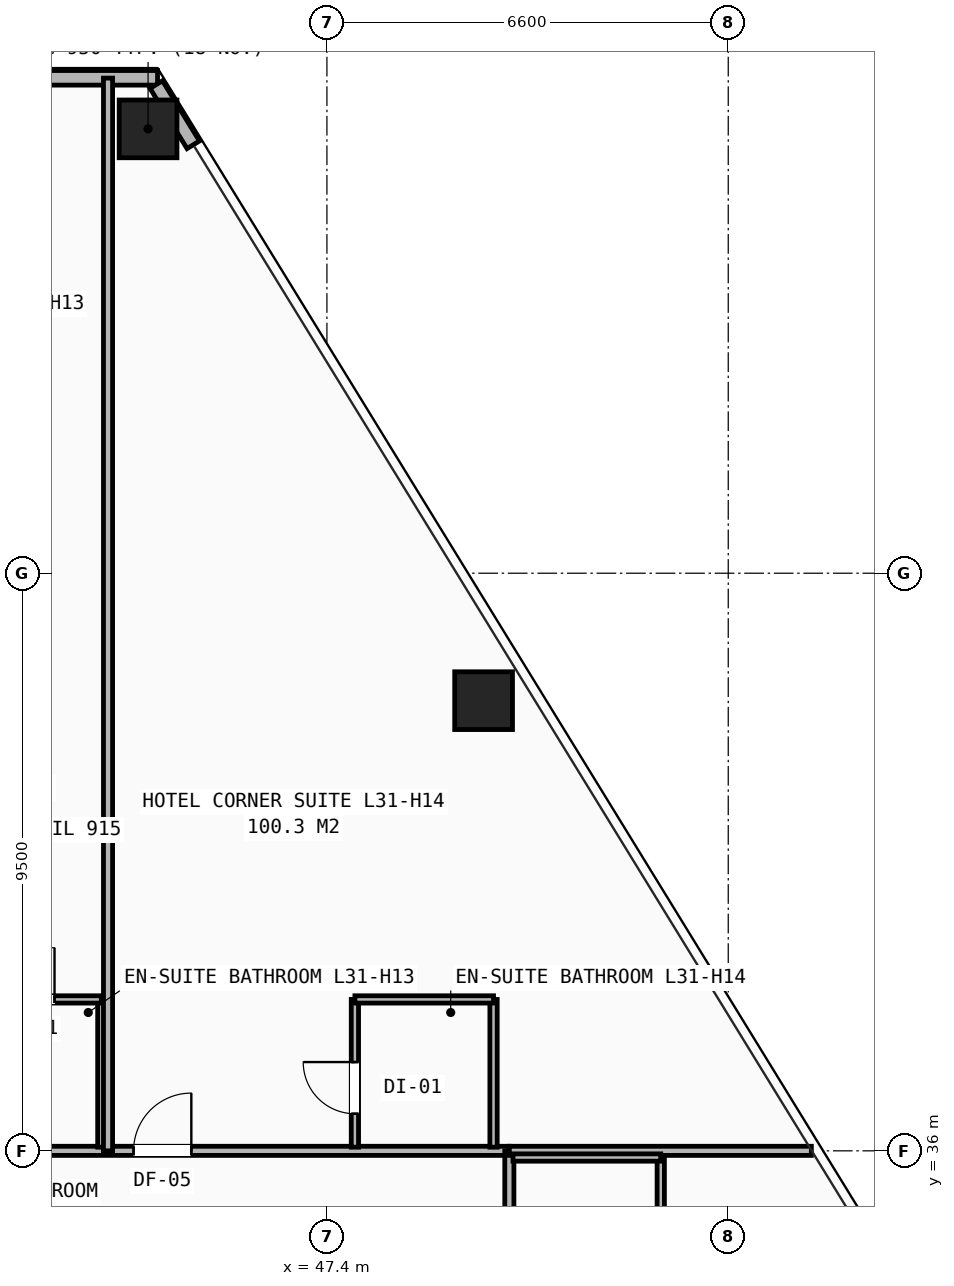
"""IFC4 building model, lengths in metres.
Left out: names, types, materials, properties, quantities, classifications, styles, units other than length and angle.
Written with IfcOpenShell. Run it as: python <this file> out.ifc"""

import sys

from ifc_helpers import new_model, si_unit, direction, frame, frame_2d, origin, origin_2d, place, context, subcontext, project, spatial, rectangle, hollow_rectangle, extrude, element, fill, save


model = new_model("IFC4")
c1 = context("Model", 3, precision=1e-05, world=origin(), true_north=direction((0.0, 1.0)))
c2 = subcontext(c1, "Body", "Model", "MODEL_VIEW")
j1 = project(units=[si_unit("LENGTHUNIT", "METRE"), si_unit("PLANEANGLEUNIT", "RADIAN")], contexts=[c1])
p1 = place(None, origin())
s1 = spatial("IfcSite", under=j1, at=p1, CompositionType="ELEMENT")
p2 = place(p1, origin())
s2 = spatial("IfcBuilding", under=s1, at=p2, CompositionType="ELEMENT")
p3 = place(p2, frame((0.0, 0.0, 108.6)))
s3 = spatial("IfcBuildingStorey", under=s2, at=p3, CompositionType="ELEMENT", Elevation=108.6)
for number, where, z_axis, x_axis in (
    (1, (44.458, 52.808, 0.0), (0.0, 0.0, 1.0), (1.0, 0.0, 0.0)),
    (2, (49.977, 43.404, 0.0), (0.0, 0.0, 1.0), (1.0, 0.0, 0.0)),
):
    element("IfcColumn", number, at=place(p3, frame(where, z_axis=z_axis, x_axis=x_axis)), inside=s3, PredefinedType="COLUMN", context=c2, shape_type="SweptSolid", body=[
        extrude(hollow_rectangle(XDim=0.95, YDim=0.95, WallThickness=0.065, at=origin_2d()), origin(), (0.0, 0.0, 1.0), 3.2),
    ])
p4 = place(p3, frame((35.386, 53.648, 0.0), z_axis=(0.0, 0.0, 1.0), x_axis=(1.0, 0.0, 0.0)))
e3 = element("IfcWall", 3, at=p4, inside=s3, PredefinedType="SHEAR", context=c2, shape_type="SweptSolid", body=[
    extrude(rectangle(XDim=9.229, YDim=0.24, at=frame_2d((4.614, 0.0))), origin(), (0.0, 0.0, 1.0), 2.223),
])
p5 = place(p3, frame((45.202, 52.546, 0.0), z_axis=(0.0, 0.0, 1.0), x_axis=(-0.523546611926, 0.851997033528, 0.0)))
e4 = element("IfcWall", 4, at=p5, inside=s3, PredefinedType="SHEAR", context=c2, shape_type="SweptSolid", body=[
    extrude(rectangle(XDim=1.163, YDim=0.24, at=frame_2d((0.581, 0.0))), origin(), (0.0, 0.0, 1.0), 2.223),
])
p6 = place(p3, frame((40.75, 36.0, 0.0), z_axis=(0.0, 0.0, 1.0), x_axis=(1.0, 0.0, 0.0)))
e5 = element("IfcWall", 5, at=p6, inside=s3, PredefinedType="PARTITIONING", context=c2, shape_type="SweptSolid", body=[
    extrude(rectangle(XDim=9.65, YDim=0.15, at=frame_2d((4.825, 0.0))), origin(), (0.0, 0.0, 1.0), 2.473),
])
p7 = place(p6, frame((3.47, 0.0, 0.0)))
e6 = element("IfcOpeningElement", 6, at=p7, cuts=e5, PredefinedType="OPENING", context=c2, shape_type="SweptSolid", body=[
    extrude(rectangle(XDim=0.95, YDim=2.1, at=frame_2d((0.475, 1.05))), frame((0.0, 0.085, 0.0), z_axis=(0.0, -1.0, 0.0), x_axis=(1.0, 0.0, 0.0)), (0.0, 0.0, 1.0), 0.17),
])
p8 = place(p3, frame((50.4, 14.1, 0.0), z_axis=(0.0, 0.0, 1.0), x_axis=(0.0, 1.0, 0.0)))
e7 = element("IfcWall", 7, at=p8, inside=s3, PredefinedType="PARTITIONING", context=c2, shape_type="SweptSolid", body=[
    extrude(rectangle(XDim=21.9, YDim=0.15, at=frame_2d((10.95, 0.0))), origin(), (0.0, 0.0, 1.0), 2.151),
])
p9 = place(p8, frame((0.42, 0.0, 0.0)))
e8 = element("IfcOpeningElement", 8, at=p9, cuts=e7, PredefinedType="OPENING", context=c2, shape_type="SweptSolid", body=[
    extrude(rectangle(XDim=0.95, YDim=2.1, at=frame_2d((0.475, 1.05))), frame((0.0, 0.085, 0.0), z_axis=(0.0, -1.0, 0.0), x_axis=(1.0, 0.0, 0.0)), (0.0, 0.0, 1.0), 0.17),
])
p10 = place(p8, frame((5.52, 0.0, 0.0)))
e9 = element("IfcOpeningElement", 9, at=p10, cuts=e7, PredefinedType="OPENING", context=c2, shape_type="SweptSolid", body=[
    extrude(rectangle(XDim=0.95, YDim=2.1, at=frame_2d((0.475, 1.05))), frame((0.0, 0.085, 0.0), z_axis=(0.0, -1.0, 0.0), x_axis=(1.0, 0.0, 0.0)), (0.0, 0.0, 1.0), 0.17),
])
p11 = place(p8, frame((10.92, 0.0, 0.0)))
e10 = element("IfcOpeningElement", 10, at=p11, cuts=e7, PredefinedType="OPENING", context=c2, shape_type="SweptSolid", body=[
    extrude(rectangle(XDim=0.95, YDim=2.1, at=frame_2d((0.475, 1.05))), frame((0.0, 0.085, 0.0), z_axis=(0.0, -1.0, 0.0), x_axis=(1.0, 0.0, 0.0)), (0.0, 0.0, 1.0), 0.17),
])
p12 = place(p8, frame((16.72, 0.0, 0.0)))
e11 = element("IfcOpeningElement", 11, at=p12, cuts=e7, PredefinedType="OPENING", context=c2, shape_type="SweptSolid", body=[
    extrude(rectangle(XDim=0.95, YDim=2.1, at=frame_2d((0.475, 1.05))), frame((0.0, 0.085, 0.0), z_axis=(0.0, -1.0, 0.0), x_axis=(1.0, 0.0, 0.0)), (0.0, 0.0, 1.0), 0.17),
])
p13 = place(p3, frame((50.4, 36.0, 0.0), z_axis=(0.0, 0.0, 1.0), x_axis=(1.0, 0.0, 0.0)))
e12 = element("IfcWall", 12, at=p13, inside=s3, PredefinedType="PARTITIONING", context=c2, shape_type="SweptSolid", body=[
    extrude(rectangle(XDim=4.967, YDim=0.15, at=frame_2d((2.483, 0.0))), origin(), (0.0, 0.0, 1.0), 2.228),
])
p14 = place(p3, frame((52.89, 33.61, 0.0), z_axis=(0.0, 0.0, 1.0), x_axis=(0.0, 1.0, 0.0)))
e13 = element("IfcWall", 13, at=p14, inside=s3, PredefinedType="PARTITIONING", context=c2, shape_type="SweptSolid", body=[
    extrude(rectangle(XDim=2.28, YDim=0.12, at=frame_2d((1.14, 0.0))), origin(), (0.0, 0.0, 1.0), 2.94),
])
for number, where, z_axis, x_axis in (
    (14, (50.46, 35.89, 0.0), (0.0, 0.0, 1.0), (1.0, 0.0, 0.0)),
    (15, (43.69, 36.06, 0.0), (0.0, 0.0, 1.0), (0.0, 1.0, 0.0)),
):
    element("IfcWall", number, at=place(p3, frame(where, z_axis=z_axis, x_axis=x_axis)), inside=s3, PredefinedType="PARTITIONING", context=c2, shape_type="SweptSolid", body=[
        extrude(rectangle(XDim=2.43, YDim=0.12, at=frame_2d((1.215, 0.0))), origin(), (0.0, 0.0, 1.0), 2.94),
    ])
p15 = place(p3, frame((41.95, 38.49, 0.0), z_axis=(0.0, 0.0, 1.0), x_axis=(1.0, 0.0, 0.0)))
e16 = element("IfcWall", 16, at=p15, inside=s3, PredefinedType="PARTITIONING", context=c2, shape_type="SweptSolid", body=[
    extrude(rectangle(XDim=1.74, YDim=0.12, at=frame_2d((0.87, 0.0))), origin(), (0.0, 0.0, 1.0), 2.94),
])
p16 = place(p15, frame((0.12, 0.0, 0.0)))
e17 = element("IfcOpeningElement", 17, at=p16, cuts=e16, PredefinedType="OPENING", context=c2, shape_type="SweptSolid", body=[
    extrude(rectangle(XDim=0.85, YDim=2.05, at=frame_2d((0.425, 1.025))), frame((0.0, 0.07, 0.0), z_axis=(0.0, -1.0, 0.0), x_axis=(1.0, 0.0, 0.0)), (0.0, 0.0, 1.0), 0.14),
])
p17 = place(p3, frame((43.8, 36.0, 0.0), z_axis=(0.0, 0.0, 1.0), x_axis=(0.0, 1.0, 0.0)))
e18 = element("IfcWall", 18, at=p17, inside=s3, PredefinedType="PARTITIONING", context=c2, shape_type="SweptSolid", body=[
    extrude(rectangle(XDim=17.643, YDim=0.15, at=frame_2d((8.821, 0.0))), origin(), (0.0, 0.0, 1.0), 2.151),
])
p18 = place(p3, frame((47.86, 36.06, 0.0), z_axis=(0.0, 0.0, 1.0), x_axis=(0.0, 1.0, 0.0)))
e19 = element("IfcWall", 19, at=p18, inside=s3, PredefinedType="PARTITIONING", context=c2, shape_type="SweptSolid", body=[
    extrude(rectangle(XDim=2.43, YDim=0.12, at=frame_2d((1.215, 0.0))), origin(), (0.0, 0.0, 1.0), 2.473),
])
p19 = place(p18, frame((0.55, 0.0, 0.0)))
e20 = element("IfcOpeningElement", 20, at=p19, cuts=e19, PredefinedType="OPENING", context=c2, shape_type="SweptSolid", body=[
    extrude(rectangle(XDim=0.85, YDim=2.05, at=frame_2d((0.425, 1.025))), frame((0.0, 0.07, 0.0), z_axis=(0.0, -1.0, 0.0), x_axis=(1.0, 0.0, 0.0)), (0.0, 0.0, 1.0), 0.14),
])
p20 = place(p3, frame((50.14, 36.06, 0.0), z_axis=(0.0, 0.0, 1.0), x_axis=(0.0, 1.0, 0.0)))
e21 = element("IfcWall", 21, at=p20, inside=s3, PredefinedType="PARTITIONING", context=c2, shape_type="SweptSolid", body=[
    extrude(rectangle(XDim=2.43, YDim=0.12, at=frame_2d((1.215, 0.0))), origin(), (0.0, 0.0, 1.0), 2.94),
])
p21 = place(p3, frame((47.86, 38.49, 0.0), z_axis=(0.0, 0.0, 1.0), x_axis=(1.0, 0.0, 0.0)))
e22 = element("IfcWall", 22, at=p21, inside=s3, PredefinedType="PARTITIONING", context=c2, shape_type="SweptSolid", body=[
    extrude(rectangle(XDim=2.28, YDim=0.12, at=frame_2d((1.14, 0.0))), origin(), (0.0, 0.0, 1.0), 2.473),
])
p22 = place(p16, origin())
e23 = element("IfcDoor", 23, at=p22, inside=s3, OperationType="SINGLE_SWING_RIGHT", PredefinedType="DOOR", context=c2, shape_type="SweptSolid", body=[
    extrude(rectangle(XDim=0.85, YDim=2.05, at=frame_2d((0.425, 1.025))), frame((0.0, 0.025, 0.0), z_axis=(0.0, -1.0, 0.0), x_axis=(1.0, 0.0, 0.0)), (0.0, 0.0, 1.0), 0.05),
])
fill(e17, e23)
p23 = place(p7, origin())
e24 = element("IfcDoor", 24, at=p23, inside=s3, OperationType="SINGLE_SWING_RIGHT", PredefinedType="DOOR", context=c2, shape_type="SweptSolid", body=[
    extrude(rectangle(XDim=0.95, YDim=2.1, at=frame_2d((0.475, 1.05))), frame((0.0, 0.025, 0.0), z_axis=(0.0, -1.0, 0.0), x_axis=(1.0, 0.0, 0.0)), (0.0, 0.0, 1.0), 0.05),
])
fill(e6, e24)
p24 = place(p19, origin())
e25 = element("IfcDoor", 25, at=p24, inside=s3, OperationType="SINGLE_SWING_RIGHT", PredefinedType="DOOR", context=c2, shape_type="SweptSolid", body=[
    extrude(rectangle(XDim=0.85, YDim=2.05, at=frame_2d((0.425, 1.025))), frame((0.0, 0.025, 0.0), z_axis=(0.0, -1.0, 0.0), x_axis=(1.0, 0.0, 0.0)), (0.0, 0.0, 1.0), 0.05),
])
fill(e20, e25)
save(model, sys.argv[1])
